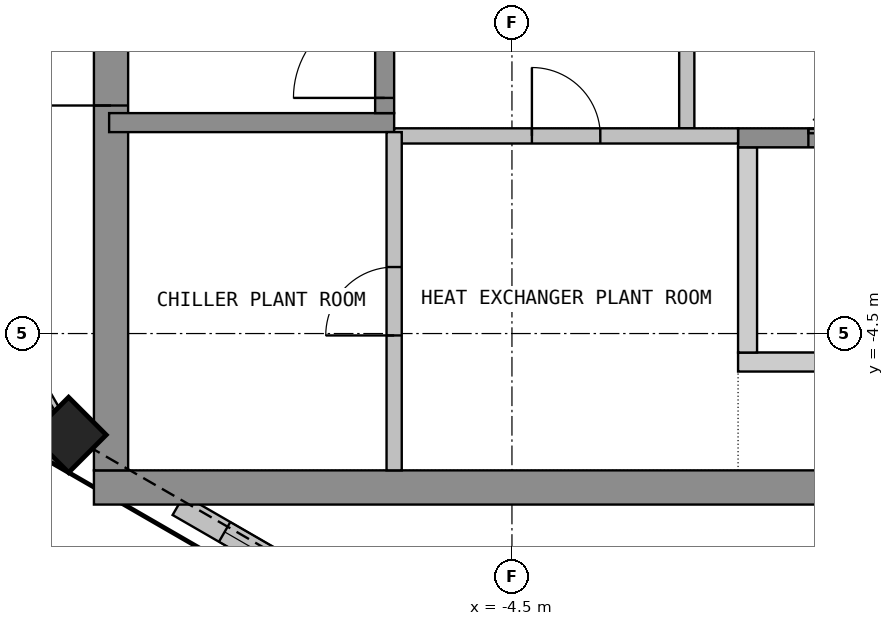
"""IFC4 building model, lengths in metres.
Left out: names, types, materials, properties, quantities, classifications, styles, units other than length and angle.
Written with IfcOpenShell. Run it as: python <this file> out.ifc"""

import sys

from ifc_helpers import new_model, si_unit, direction, frame, frame_2d, origin, origin_2d, place, context, subcontext, project, spatial, polyline, rectangle, outline, extrude, element, fill, save


model = new_model("IFC4")
c1 = context("Model", 3, precision=1e-05, world=origin(), true_north=direction((0.0, 1.0)))
c2 = subcontext(c1, "Body", "Model", "MODEL_VIEW")
j1 = project(units=[si_unit("LENGTHUNIT", "METRE"), si_unit("PLANEANGLEUNIT", "RADIAN")], contexts=[c1])
p1 = place(None, origin())
s1 = spatial("IfcSite", under=j1, at=p1, CompositionType="ELEMENT")
p2 = place(p1, origin())
s2 = spatial("IfcBuilding", under=s1, at=p2, CompositionType="ELEMENT")
p3 = place(p2, frame((0.0, 0.0, 332.4)))
s3 = spatial("IfcBuildingStorey", under=s2, at=p3, CompositionType="ELEMENT", Elevation=332.4)
p4 = place(p3, frame((-10.333, -5.833, 0.0), z_axis=(0.0, 0.0, 1.0), x_axis=(0.707106781187, -0.707106781187, 0.0)))
e1 = element("IfcColumn", 1, at=p4, inside=s3, PredefinedType="COLUMN", context=c2, shape_type="SweptSolid", body=[
    extrude(rectangle(XDim=0.7, YDim=0.7, at=origin_2d()), origin(), (0.0, 0.0, 1.0), 4.05),
])
p5 = place(p3, frame((-12.346, -2.505, 0.0), z_axis=(0.0, 0.0, 1.0), x_axis=(0.499987607361, -0.86603255856, 0.0)))
e2 = element("IfcWall", 2, at=p5, inside=s3, PredefinedType="SOLIDWALL", context=c2, shape_type="SweptSolid", body=[
    extrude(rectangle(XDim=3.507, YDim=0.3, at=frame_2d((1.753, 0.0))), origin(), (0.0, 0.0, 1.0), 3.15),
])
p6 = place(p5, frame((0.553, 0.0, 0.6)))
e3 = element("IfcOpeningElement", 3, at=p6, cuts=e2, PredefinedType="OPENING", context=c2, shape_type="SweptSolid", body=[
    extrude(rectangle(XDim=2.4, YDim=2.3, at=frame_2d((1.2, 1.15))), frame((0.0, 0.16, 0.0), z_axis=(0.0, -1.0, 0.0), x_axis=(1.0, 0.0, 0.0)), (0.0, 0.0, 1.0), 0.32),
])
p7 = place(p3, frame((-8.89, -6.758, 0.0), z_axis=(0.0, 0.0, 1.0), x_axis=(0.866060442015, -0.499939307093, 0.0)))
e4 = element("IfcWall", 4, at=p7, inside=s3, PredefinedType="SOLIDWALL", context=c2, shape_type="SweptSolid", body=[
    extrude(rectangle(XDim=2.177, YDim=0.3, at=frame_2d((1.088, 0.0))), origin(), (0.0, 0.0, 1.0), 3.15),
])
p8 = place(p7, frame((0.704, 0.0, 0.6)))
e5 = element("IfcOpeningElement", 5, at=p8, cuts=e4, PredefinedType="OPENING", context=c2, shape_type="SweptSolid", body=[
    extrude(rectangle(XDim=1.3, YDim=2.3, at=frame_2d((0.65, 1.15))), frame((0.0, 0.16, 0.0), z_axis=(0.0, -1.0, 0.0), x_axis=(1.0, 0.0, 0.0)), (0.0, 0.0, 1.0), 0.32),
])
p9 = place(p3, frame((-10.0, -6.525, 0.0), z_axis=(0.0, 0.0, 1.0), x_axis=(1.0, 0.0, 0.0)))
e6 = element("IfcWall", 6, at=p9, inside=s3, PredefinedType="SHEAR", context=c2, shape_type="SweptSolid", body=[
    extrude(rectangle(XDim=20.0, YDim=0.45, at=frame_2d((10.0, 0.0))), origin(), (0.0, 0.0, 1.0), 4.05),
])
p10 = place(p3, frame((-9.775, -6.3, 0.0), z_axis=(0.0, 0.0, 1.0), x_axis=(0.0, 1.0, 0.0)))
e7 = element("IfcWall", 7, at=p10, inside=s3, PredefinedType="SHEAR", context=c2, shape_type="SweptSolid", body=[
    extrude(rectangle(XDim=12.6, YDim=0.45, at=frame_2d((6.3, 0.0))), origin(), (0.0, 0.0, 1.0), 4.05),
])
p11 = place(p10, frame((4.8, 0.0, 0.0)))
e8 = element("IfcOpeningElement", 8, at=p11, cuts=e7, PredefinedType="OPENING", context=c2, shape_type="SweptSolid", body=[
    extrude(rectangle(XDim=1.2, YDim=2.1, at=frame_2d((0.6, 1.05))), frame((0.0, 0.235, 0.0), z_axis=(0.0, -1.0, 0.0), x_axis=(1.0, 0.0, 0.0)), (0.0, 0.0, 1.0), 0.47),
])
p12 = place(p3, origin())
e9 = element("IfcWall", 9, at=p12, inside=s3, PredefinedType="SHEAR", context=c2, shape_type="SweptSolid", body=[
    extrude(outline(polyline([(-1.525, -5.0), (1.525, -5.0), (1.525, -4.75), (-1.525, -4.75), (-1.525, -5.0)])), origin(), (0.0, 0.0, 1.0), 4.05),
])
p13 = place(p3, origin())
e10 = element("IfcWall", 10, at=p13, inside=s3, PredefinedType="SHEAR", context=c2, shape_type="SweptSolid", body=[
    extrude(outline(polyline([(-1.525, -4.75), (-1.275, -4.75), (-1.275, -2.05), (-1.525, -2.05), (-1.525, -4.75)])), origin(), (0.0, 0.0, 1.0), 4.05),
])
p14 = place(p3, frame((-1.525, -1.925, 0.0), z_axis=(0.0, 0.0, 1.0), x_axis=(1.0, 0.0, 0.0)))
e11 = element("IfcWall", 11, at=p14, inside=s3, PredefinedType="SHEAR", context=c2, shape_type="SweptSolid", body=[
    extrude(rectangle(XDim=3.05, YDim=0.25, at=frame_2d((1.525, 0.0))), origin(), (0.0, 0.0, 1.0), 4.05),
])
p15 = place(p14, frame((0.925, 0.0, 0.0)))
e12 = element("IfcOpeningElement", 12, at=p15, cuts=e11, PredefinedType="OPENING", context=c2, shape_type="SweptSolid", body=[
    extrude(rectangle(XDim=1.2, YDim=2.1, at=frame_2d((0.6, 1.05))), frame((0.0, 0.135, 0.0), z_axis=(0.0, -1.0, 0.0), x_axis=(1.0, 0.0, 0.0)), (0.0, 0.0, 1.0), 0.27),
])
p16 = place(p3, frame((-2.2, -1.8, 0.0), z_axis=(0.0, 0.0, 1.0), x_axis=(0.0, 1.0, 0.0)))
e13 = element("IfcWall", 13, at=p16, inside=s3, PredefinedType="PARTITIONING", context=c2, shape_type="SweptSolid", body=[
    extrude(rectangle(XDim=3.6, YDim=0.2, at=frame_2d((1.8, 0.0))), origin(), (0.0, 0.0, 1.0), 4.05),
])
p17 = place(p16, frame((1.2, 0.0, 0.0)))
e14 = element("IfcOpeningElement", 14, at=p17, cuts=e13, PredefinedType="OPENING", context=c2, shape_type="SweptSolid", body=[
    extrude(rectangle(XDim=1.2, YDim=2.1, at=frame_2d((0.6, 1.05))), frame((0.0, 0.11, 0.0), z_axis=(0.0, -1.0, 0.0), x_axis=(1.0, 0.0, 0.0)), (0.0, 0.0, 1.0), 0.22),
])
p18 = place(p3, frame((-9.8, -1.725, 0.0), z_axis=(0.0, 0.0, 1.0), x_axis=(1.0, 0.0, 0.0)))
e15 = element("IfcWall", 15, at=p18, inside=s3, PredefinedType="SHEAR", context=c2, shape_type="SweptSolid", body=[
    extrude(rectangle(XDim=3.75, YDim=0.25, at=frame_2d((1.875, 0.0))), origin(), (0.0, 0.0, 1.0), 4.05),
])
p19 = place(p3, frame((-6.175, -1.6, 0.0), z_axis=(0.0, 0.0, 1.0), x_axis=(0.0, 1.0, 0.0)))
e16 = element("IfcWall", 16, at=p19, inside=s3, PredefinedType="SHEAR", context=c2, shape_type="SweptSolid", body=[
    extrude(rectangle(XDim=6.6, YDim=0.25, at=frame_2d((3.3, 0.0))), origin(), (0.0, 0.0, 1.0), 4.05),
])
p20 = place(p19, frame((0.2, 0.0, 0.0)))
e17 = element("IfcOpeningElement", 17, at=p20, cuts=e16, PredefinedType="OPENING", context=c2, shape_type="SweptSolid", body=[
    extrude(rectangle(XDim=1.2, YDim=2.1, at=frame_2d((0.6, 1.05))), frame((0.0, 0.135, 0.0), z_axis=(0.0, -1.0, 0.0), x_axis=(1.0, 0.0, 0.0)), (0.0, 0.0, 1.0), 0.27),
])
p21 = place(p3, frame((-6.05, -1.9, 0.0), z_axis=(0.0, 0.0, 1.0), x_axis=(1.0, 0.0, 0.0)))
e18 = element("IfcWall", 18, at=p21, inside=s3, PredefinedType="PARTITIONING", context=c2, shape_type="SweptSolid", body=[
    extrude(rectangle(XDim=4.525, YDim=0.2, at=frame_2d((2.263, 0.0))), origin(), (0.0, 0.0, 1.0), 4.05),
])
p22 = place(p21, frame((1.812, 0.0, 0.0)))
e19 = element("IfcOpeningElement", 19, at=p22, cuts=e18, PredefinedType="OPENING", context=c2, shape_type="SweptSolid", body=[
    extrude(rectangle(XDim=0.9, YDim=2.1, at=frame_2d((0.45, 1.05))), frame((0.0, 0.11, 0.0), z_axis=(0.0, -1.0, 0.0), x_axis=(1.0, 0.0, 0.0)), (0.0, 0.0, 1.0), 0.22),
])
p23 = place(p3, frame((-6.05, -6.3, 0.0), z_axis=(0.0, 0.0, 1.0), x_axis=(0.0, 1.0, 0.0)))
e20 = element("IfcWall", 20, at=p23, inside=s3, PredefinedType="PARTITIONING", context=c2, shape_type="SweptSolid", body=[
    extrude(rectangle(XDim=4.45, YDim=0.2, at=frame_2d((2.225, 0.0))), origin(), (0.0, 0.0, 1.0), 4.05),
])
p24 = place(p23, frame((1.775, 0.0, 0.0)))
e21 = element("IfcOpeningElement", 21, at=p24, cuts=e20, PredefinedType="OPENING", context=c2, shape_type="SweptSolid", body=[
    extrude(rectangle(XDim=0.9, YDim=2.1, at=frame_2d((0.45, 1.05))), frame((0.0, 0.11, 0.0), z_axis=(0.0, -1.0, 0.0), x_axis=(1.0, 0.0, 0.0)), (0.0, 0.0, 1.0), 0.22),
])
p25 = place(p8, origin())
e22 = element("IfcWindow", 22, at=p25, inside=s3, PartitioningType="SINGLE_PANEL", PredefinedType="WINDOW", context=c2, shape_type="SweptSolid", body=[
    extrude(rectangle(XDim=1.3, YDim=2.3, at=frame_2d((0.65, 1.15))), frame((0.0, 0.03, 0.0), z_axis=(0.0, -1.0, 0.0), x_axis=(1.0, 0.0, 0.0)), (0.0, 0.0, 1.0), 0.06),
])
fill(e5, e22)
p26 = place(p11, origin())
e23 = element("IfcDoor", 23, at=p26, inside=s3, OperationType="SINGLE_SWING_RIGHT", PredefinedType="DOOR", context=c2, shape_type="SweptSolid", body=[
    extrude(rectangle(XDim=1.2, YDim=2.1, at=frame_2d((0.6, 1.05))), frame((0.0, 0.025, 0.0), z_axis=(0.0, -1.0, 0.0), x_axis=(1.0, 0.0, 0.0)), (0.0, 0.0, 1.0), 0.05),
])
fill(e8, e23)
p27 = place(p15, origin())
e24 = element("IfcDoor", 24, at=p27, inside=s3, OperationType="DOUBLE_DOOR_SLIDING", PredefinedType="DOOR", context=c2, shape_type="SweptSolid", body=[
    extrude(rectangle(XDim=1.2, YDim=2.1, at=frame_2d((0.6, 1.05))), frame((0.0, 0.025, 0.0), z_axis=(0.0, -1.0, 0.0), x_axis=(1.0, 0.0, 0.0)), (0.0, 0.0, 1.0), 0.05),
])
fill(e12, e24)
p28 = place(p20, origin())
e25 = element("IfcDoor", 25, at=p28, inside=s3, OperationType="SINGLE_SWING_LEFT", PredefinedType="DOOR", context=c2, shape_type="SweptSolid", body=[
    extrude(rectangle(XDim=1.2, YDim=2.1, at=frame_2d((0.6, 1.05))), frame((0.0, 0.025, 0.0), z_axis=(0.0, -1.0, 0.0), x_axis=(1.0, 0.0, 0.0)), (0.0, 0.0, 1.0), 0.05),
])
fill(e17, e25)
p29 = place(p22, origin())
e26 = element("IfcDoor", 26, at=p29, inside=s3, OperationType="SINGLE_SWING_LEFT", PredefinedType="DOOR", context=c2, shape_type="SweptSolid", body=[
    extrude(rectangle(XDim=0.9, YDim=2.1, at=frame_2d((0.45, 1.05))), frame((0.0, 0.025, 0.0), z_axis=(0.0, -1.0, 0.0), x_axis=(1.0, 0.0, 0.0)), (0.0, 0.0, 1.0), 0.05),
])
fill(e19, e26)
p30 = place(p24, origin())
e27 = element("IfcDoor", 27, at=p30, inside=s3, OperationType="SINGLE_SWING_LEFT", PredefinedType="DOOR", context=c2, shape_type="SweptSolid", body=[
    extrude(rectangle(XDim=0.9, YDim=2.1, at=frame_2d((0.45, 1.05))), frame((0.0, 0.025, 0.0), z_axis=(0.0, -1.0, 0.0), x_axis=(1.0, 0.0, 0.0)), (0.0, 0.0, 1.0), 0.05),
])
fill(e21, e27)
save(model, sys.argv[1])
